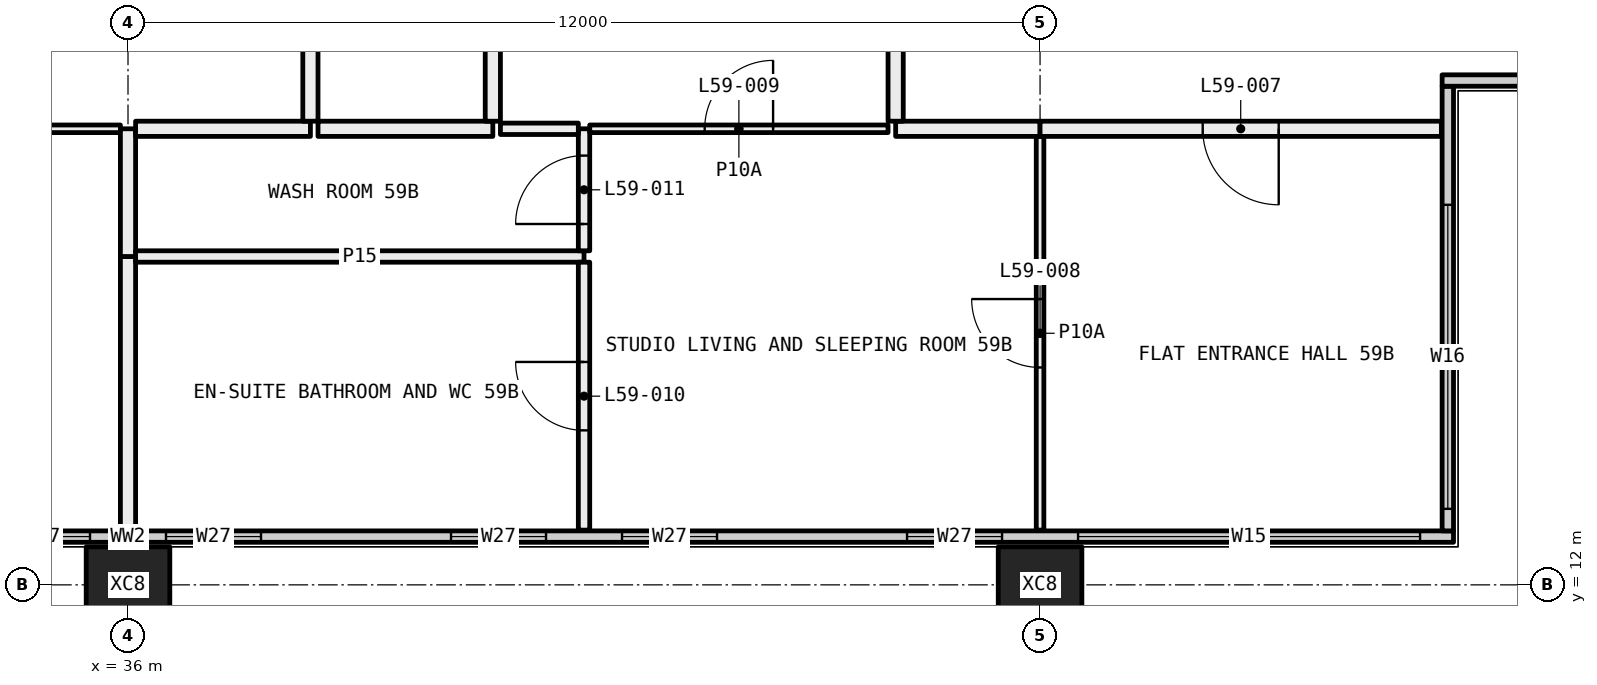
"""IFC4 building model, lengths in metres.
Left out: names, types, materials, properties, quantities, classifications, styles, units other than length and angle.
Written with IfcOpenShell. Run it as: python <this file> out.ifc"""

import sys

from ifc_helpers import new_model, si_unit, direction, frame, frame_2d, origin, origin_2d, place, context, subcontext, project, spatial, rectangle, hollow_rectangle, extrude, element, fill, save


model = new_model("IFC4")
c1 = context("Model", 3, precision=1e-05, world=origin(), true_north=direction((0.0, 1.0)))
c2 = subcontext(c1, "Body", "Model", "MODEL_VIEW")
j1 = project(units=[si_unit("LENGTHUNIT", "METRE"), si_unit("PLANEANGLEUNIT", "RADIAN")], contexts=[c1])
p1 = place(None, origin())
s1 = spatial("IfcSite", under=j1, at=p1, CompositionType="ELEMENT")
p2 = place(p1, origin())
s2 = spatial("IfcBuilding", under=s1, at=p2, CompositionType="ELEMENT")
p3 = place(p2, frame((0.0, 0.0, 221.4)))
s3 = spatial("IfcBuildingStorey", under=s2, at=p3, CompositionType="ELEMENT", Elevation=221.4)
for number, where, z_axis, x_axis in (
    (1, (36.0, 12.0, -0.4), (0.0, 0.0, 1.0), (1.0, 0.0, 0.0)),
    (2, (48.0, 12.0, -0.4), (0.0, 0.0, 1.0), (1.0, 0.0, 0.0)),
):
    element("IfcColumn", number, at=place(p3, frame(where, z_axis=z_axis, x_axis=x_axis)), inside=s3, PredefinedType="COLUMN", context=c2, shape_type="SweptSolid", body=[
        extrude(hollow_rectangle(XDim=1.1, YDim=1.0, WallThickness=0.04, at=origin_2d()), origin(), (0.0, 0.0, 1.0), 3.45),
    ])
p4 = place(p3, frame((18.56, 12.635, 0.0), z_axis=(0.0, 0.0, 1.0), x_axis=(1.0, 0.0, 0.0)))
e3 = element("IfcWall", 3, at=p4, inside=s3, PredefinedType="ELEMENTEDWALL", context=c2, shape_type="SweptSolid", body=[
    extrude(rectangle(XDim=34.88, YDim=0.15, at=frame_2d((17.44, 0.0))), origin(), (0.0, 0.0, 1.0), 3.05),
])
p5 = place(p4, frame((0.44, 0.0, 0.45)))
e4 = element("IfcOpeningElement", 4, at=p5, cuts=e3, PredefinedType="OPENING", context=c2, shape_type="SweptSolid", body=[
    extrude(rectangle(XDim=4.5, YDim=2.55, at=frame_2d((2.25, 1.275))), frame((0.0, 0.085, 0.0), z_axis=(0.0, -1.0, 0.0), x_axis=(1.0, 0.0, 0.0)), (0.0, 0.0, 1.0), 0.17),
])
p6 = place(p4, frame((5.94, 0.0, 0.45)))
e5 = element("IfcOpeningElement", 5, at=p6, cuts=e3, PredefinedType="OPENING", context=c2, shape_type="SweptSolid", body=[
    extrude(rectangle(XDim=1.25, YDim=2.55, at=frame_2d((0.625, 1.275))), frame((0.0, 0.085, 0.0), z_axis=(0.0, -1.0, 0.0), x_axis=(1.0, 0.0, 0.0)), (0.0, 0.0, 1.0), 0.17),
])
p7 = place(p4, frame((9.69, 0.0, 0.45)))
e6 = element("IfcOpeningElement", 6, at=p7, cuts=e3, PredefinedType="OPENING", context=c2, shape_type="SweptSolid", body=[
    extrude(rectangle(XDim=1.25, YDim=2.55, at=frame_2d((0.625, 1.275))), frame((0.0, 0.085, 0.0), z_axis=(0.0, -1.0, 0.0), x_axis=(1.0, 0.0, 0.0)), (0.0, 0.0, 1.0), 0.17),
])
p8 = place(p4, frame((11.94, 0.0, 0.45)))
e7 = element("IfcOpeningElement", 7, at=p8, cuts=e3, PredefinedType="OPENING", context=c2, shape_type="SweptSolid", body=[
    extrude(rectangle(XDim=1.25, YDim=2.55, at=frame_2d((0.625, 1.275))), frame((0.0, 0.085, 0.0), z_axis=(0.0, -1.0, 0.0), x_axis=(1.0, 0.0, 0.0)), (0.0, 0.0, 1.0), 0.17),
])
p9 = place(p4, frame((15.69, 0.0, 0.45)))
e8 = element("IfcOpeningElement", 8, at=p9, cuts=e3, PredefinedType="OPENING", context=c2, shape_type="SweptSolid", body=[
    extrude(rectangle(XDim=1.25, YDim=2.55, at=frame_2d((0.625, 1.275))), frame((0.0, 0.085, 0.0), z_axis=(0.0, -1.0, 0.0), x_axis=(1.0, 0.0, 0.0)), (0.0, 0.0, 1.0), 0.17),
])
p10 = place(p4, frame((17.94, 0.0, 0.45)))
e9 = element("IfcOpeningElement", 9, at=p10, cuts=e3, PredefinedType="OPENING", context=c2, shape_type="SweptSolid", body=[
    extrude(rectangle(XDim=1.25, YDim=2.55, at=frame_2d((0.625, 1.275))), frame((0.0, 0.085, 0.0), z_axis=(0.0, -1.0, 0.0), x_axis=(1.0, 0.0, 0.0)), (0.0, 0.0, 1.0), 0.17),
])
p11 = place(p4, frame((21.69, 0.0, 0.45)))
e10 = element("IfcOpeningElement", 10, at=p11, cuts=e3, PredefinedType="OPENING", context=c2, shape_type="SweptSolid", body=[
    extrude(rectangle(XDim=1.25, YDim=2.55, at=frame_2d((0.625, 1.275))), frame((0.0, 0.085, 0.0), z_axis=(0.0, -1.0, 0.0), x_axis=(1.0, 0.0, 0.0)), (0.0, 0.0, 1.0), 0.17),
])
p12 = place(p4, frame((23.94, 0.0, 0.45)))
e11 = element("IfcOpeningElement", 11, at=p12, cuts=e3, PredefinedType="OPENING", context=c2, shape_type="SweptSolid", body=[
    extrude(rectangle(XDim=1.25, YDim=2.55, at=frame_2d((0.625, 1.275))), frame((0.0, 0.085, 0.0), z_axis=(0.0, -1.0, 0.0), x_axis=(1.0, 0.0, 0.0)), (0.0, 0.0, 1.0), 0.17),
])
p13 = place(p4, frame((27.69, 0.0, 0.45)))
e12 = element("IfcOpeningElement", 12, at=p13, cuts=e3, PredefinedType="OPENING", context=c2, shape_type="SweptSolid", body=[
    extrude(rectangle(XDim=1.25, YDim=2.55, at=frame_2d((0.625, 1.275))), frame((0.0, 0.085, 0.0), z_axis=(0.0, -1.0, 0.0), x_axis=(1.0, 0.0, 0.0)), (0.0, 0.0, 1.0), 0.17),
])
p14 = place(p4, frame((29.94, 0.0, 0.45)))
e13 = element("IfcOpeningElement", 13, at=p14, cuts=e3, PredefinedType="OPENING", context=c2, shape_type="SweptSolid", body=[
    extrude(rectangle(XDim=4.5, YDim=2.55, at=frame_2d((2.25, 1.275))), frame((0.0, 0.085, 0.0), z_axis=(0.0, -1.0, 0.0), x_axis=(1.0, 0.0, 0.0)), (0.0, 0.0, 1.0), 0.17),
])
p15 = place(p3, frame((53.365, 12.71, 0.0), z_axis=(0.0, 0.0, 1.0), x_axis=(0.0, 1.0, 0.0)))
e14 = element("IfcWall", 14, at=p15, inside=s3, PredefinedType="ELEMENTEDWALL", context=c2, shape_type="SweptSolid", body=[
    extrude(rectangle(XDim=5.85, YDim=0.15, at=frame_2d((2.925, 0.0))), origin(), (0.0, 0.0, 1.0), 3.05),
])
p16 = place(p15, frame((0.29, 0.0, 0.45)))
e15 = element("IfcOpeningElement", 15, at=p16, cuts=e14, PredefinedType="OPENING", context=c2, shape_type="SweptSolid", body=[
    extrude(rectangle(XDim=4.0, YDim=2.55, at=frame_2d((2.0, 1.275))), frame((0.0, 0.085, 0.0), z_axis=(0.0, -1.0, 0.0), x_axis=(1.0, 0.0, 0.0)), (0.0, 0.0, 1.0), 0.17),
])
p17 = place(p3, frame((53.29, 18.635, 0.0), z_axis=(0.0, 0.0, 1.0), x_axis=(1.0, 0.0, 0.0)))
e16 = element("IfcWall", 16, at=p17, inside=s3, PredefinedType="ELEMENTEDWALL", context=c2, shape_type="SweptSolid", body=[
    extrude(rectangle(XDim=6.15, YDim=0.15, at=frame_2d((3.075, 0.0))), origin(), (0.0, 0.0, 1.0), 3.05),
])
p18 = place(p17, frame((1.71, 0.0, 0.45)))
e17 = element("IfcOpeningElement", 17, at=p18, cuts=e16, PredefinedType="OPENING", context=c2, shape_type="SweptSolid", body=[
    extrude(rectangle(XDim=4.0, YDim=2.55, at=frame_2d((2.0, 1.275))), frame((0.0, 0.085, 0.0), z_axis=(0.0, -1.0, 0.0), x_axis=(1.0, 0.0, 0.0)), (0.0, 0.0, 1.0), 0.17),
])
p19 = place(p3, frame((35.9, 18.0, 0.0), z_axis=(0.0, 0.0, 1.0), x_axis=(-1.0, 0.0, 0.0)))
e18 = element("IfcWall", 18, at=p19, inside=s3, PredefinedType="PARTITIONING", context=c2, shape_type="SweptSolid", body=[
    extrude(rectangle(XDim=1.4, YDim=0.1, at=frame_2d((0.7, 0.0))), origin(), (0.0, 0.0, 1.0), 3.05),
])
p20 = place(p3, frame((36.0, 12.72, 0.0), z_axis=(0.0, 0.0, 1.0), x_axis=(0.0, 1.0, 0.0)))
e19 = element("IfcWall", 19, at=p20, inside=s3, PredefinedType="PARTITIONING", context=c2, shape_type="SweptSolid", body=[
    extrude(rectangle(XDim=3.6, YDim=0.2, at=frame_2d((1.8, 0.0))), origin(), (0.0, 0.0, 1.0), 2.45),
])
p21 = place(p3, frame((36.0, 16.32, 0.0), z_axis=(0.0, 0.0, 1.0), x_axis=(0.0, 1.0, 0.0)))
e20 = element("IfcWall", 20, at=p21, inside=s3, PredefinedType="PARTITIONING", context=c2, shape_type="SweptSolid", body=[
    extrude(rectangle(XDim=1.68, YDim=0.2, at=frame_2d((0.84, 0.0))), origin(), (0.0, 0.0, 1.0), 2.45),
])
p22 = place(p3, frame((36.1, 18.0, 0.0), z_axis=(0.0, 0.0, 1.0), x_axis=(1.0, 0.0, 0.0)))
e21 = element("IfcWall", 21, at=p22, inside=s3, PredefinedType="PARTITIONING", context=c2, shape_type="SweptSolid", body=[
    extrude(rectangle(XDim=2.3, YDim=0.2, at=frame_2d((1.15, 0.0))), origin(), (0.0, 0.0, 1.0), 3.05),
])
p23 = place(p3, frame((38.4, 18.1, 0.0), z_axis=(0.0, 0.0, 1.0), x_axis=(0.0, 1.0, 0.0)))
e22 = element("IfcWall", 22, at=p23, inside=s3, PredefinedType="PARTITIONING", context=c2, shape_type="SweptSolid", body=[
    extrude(rectangle(XDim=5.7, YDim=0.2, at=frame_2d((2.85, 0.0))), origin(), (0.0, 0.0, 1.0), 3.05),
])
p24 = place(p3, frame((42.0, 16.32, 0.0), z_axis=(0.0, 0.0, 1.0), x_axis=(-1.0, 0.0, 0.0)))
e23 = element("IfcWall", 23, at=p24, inside=s3, PredefinedType="PARTITIONING", context=c2, shape_type="SweptSolid", body=[
    extrude(rectangle(XDim=5.9, YDim=0.15, at=frame_2d((2.95, 0.0))), origin(), (0.0, 0.0, 1.0), 3.05),
])
p25 = place(p3, frame((42.0, 12.72, 0.0), z_axis=(0.0, 0.0, 1.0), x_axis=(0.0, 1.0, 0.0)))
e24 = element("IfcWall", 24, at=p25, inside=s3, PredefinedType="PARTITIONING", context=c2, shape_type="SweptSolid", body=[
    extrude(rectangle(XDim=3.525, YDim=0.15, at=frame_2d((1.763, 0.0))), origin(), (0.0, 0.0, 1.0), 3.05),
])
p26 = place(p25, frame((1.312, 0.0, 0.0)))
e25 = element("IfcOpeningElement", 25, at=p26, cuts=e24, PredefinedType="OPENING", context=c2, shape_type="SweptSolid", body=[
    extrude(rectangle(XDim=0.9, YDim=2.1, at=frame_2d((0.45, 1.05))), frame((0.0, 0.085, 0.0), z_axis=(0.0, -1.0, 0.0), x_axis=(1.0, 0.0, 0.0)), (0.0, 0.0, 1.0), 0.17),
])
p27 = place(p3, frame((42.0, 16.395, 0.0), z_axis=(0.0, 0.0, 1.0), x_axis=(0.0, 1.0, 0.0)))
e26 = element("IfcWall", 26, at=p27, inside=s3, PredefinedType="PARTITIONING", context=c2, shape_type="SweptSolid", body=[
    extrude(rectangle(XDim=1.605, YDim=0.15, at=frame_2d((0.802, 0.0))), origin(), (0.0, 0.0, 1.0), 3.05),
])
p28 = place(p27, frame((0.353, 0.0, 0.0)))
e27 = element("IfcOpeningElement", 27, at=p28, cuts=e26, PredefinedType="OPENING", context=c2, shape_type="SweptSolid", body=[
    extrude(rectangle(XDim=0.9, YDim=2.1, at=frame_2d((0.45, 1.05))), frame((0.0, 0.085, 0.0), z_axis=(0.0, -1.0, 0.0), x_axis=(1.0, 0.0, 0.0)), (0.0, 0.0, 1.0), 0.17),
])
p29 = place(p3, frame((41.925, 18.0, 0.0), z_axis=(0.0, 0.0, 1.0), x_axis=(-1.0, 0.0, 0.0)))
e28 = element("IfcWall", 28, at=p29, inside=s3, PredefinedType="PARTITIONING", context=c2, shape_type="SweptSolid", body=[
    extrude(rectangle(XDim=1.025, YDim=0.15, at=frame_2d((0.513, 0.0))), origin(), (0.0, 0.0, 1.0), 3.05),
])
p30 = place(p3, frame((40.8, 18.0, 0.0), z_axis=(0.0, 0.0, 1.0), x_axis=(-1.0, 0.0, 0.0)))
e29 = element("IfcWall", 29, at=p30, inside=s3, PredefinedType="PARTITIONING", context=c2, shape_type="SweptSolid", body=[
    extrude(rectangle(XDim=2.3, YDim=0.2, at=frame_2d((1.15, 0.0))), origin(), (0.0, 0.0, 1.0), 3.05),
])
p31 = place(p3, frame((48.0, 12.72, 0.0), z_axis=(0.0, 0.0, 1.0), x_axis=(0.0, 1.0, 0.0)))
e30 = element("IfcWall", 30, at=p31, inside=s3, PredefinedType="PARTITIONING", context=c2, shape_type="SweptSolid", body=[
    extrude(rectangle(XDim=5.18, YDim=0.1, at=frame_2d((2.59, 0.0))), origin(), (0.0, 0.0, 1.0), 3.05),
])
p32 = place(p31, frame((2.14, 0.0, 0.0)))
e31 = element("IfcOpeningElement", 31, at=p32, cuts=e30, PredefinedType="OPENING", context=c2, shape_type="SweptSolid", body=[
    extrude(rectangle(XDim=0.9, YDim=2.1, at=frame_2d((0.45, 1.05))), frame((0.0, 0.06, 0.0), z_axis=(0.0, -1.0, 0.0), x_axis=(1.0, 0.0, 0.0)), (0.0, 0.0, 1.0), 0.12),
])
p33 = place(p3, frame((46.0, 18.0, 0.0), z_axis=(0.0, 0.0, 1.0), x_axis=(-1.0, 0.0, 0.0)))
e32 = element("IfcWall", 32, at=p33, inside=s3, PredefinedType="PARTITIONING", context=c2, shape_type="SweptSolid", body=[
    extrude(rectangle(XDim=3.925, YDim=0.1, at=frame_2d((1.962, 0.0))), origin(), (0.0, 0.0, 1.0), 3.05),
])
p34 = place(p33, frame((1.512, 0.0, 0.0)))
e33 = element("IfcOpeningElement", 33, at=p34, cuts=e32, PredefinedType="OPENING", context=c2, shape_type="SweptSolid", body=[
    extrude(rectangle(XDim=0.9, YDim=2.1, at=frame_2d((0.45, 1.05))), frame((0.0, 0.06, 0.0), z_axis=(0.0, -1.0, 0.0), x_axis=(1.0, 0.0, 0.0)), (0.0, 0.0, 1.0), 0.12),
])
p35 = place(p3, frame((48.0, 18.0, 0.0), z_axis=(0.0, 0.0, 1.0), x_axis=(-1.0, 0.0, 0.0)))
e34 = element("IfcWall", 34, at=p35, inside=s3, PredefinedType="PARTITIONING", context=c2, shape_type="SweptSolid", body=[
    extrude(rectangle(XDim=1.9, YDim=0.2, at=frame_2d((0.95, 0.0))), origin(), (0.0, 0.0, 1.0), 3.05),
])
p36 = place(p3, frame((53.28, 18.0, 0.0), z_axis=(0.0, 0.0, 1.0), x_axis=(-1.0, 0.0, 0.0)))
e35 = element("IfcWall", 35, at=p36, inside=s3, PredefinedType="PARTITIONING", context=c2, shape_type="SweptSolid", body=[
    extrude(rectangle(XDim=5.28, YDim=0.2, at=frame_2d((2.64, 0.0))), origin(), (0.0, 0.0, 1.0), 3.05),
])
p37 = place(p36, frame((2.14, 0.0, 0.0)))
e36 = element("IfcOpeningElement", 36, at=p37, cuts=e35, PredefinedType="OPENING", context=c2, shape_type="SweptSolid", body=[
    extrude(rectangle(XDim=1.0, YDim=2.1, at=frame_2d((0.5, 1.05))), frame((0.0, 0.11, 0.0), z_axis=(0.0, -1.0, 0.0), x_axis=(1.0, 0.0, 0.0)), (0.0, 0.0, 1.0), 0.22),
])
p38 = place(p3, frame((46.1, 18.1, 0.0), z_axis=(0.0, 0.0, 1.0), x_axis=(0.0, 1.0, 0.0)))
e37 = element("IfcWall", 37, at=p38, inside=s3, PredefinedType="PARTITIONING", context=c2, shape_type="SweptSolid", body=[
    extrude(rectangle(XDim=5.7, YDim=0.2, at=frame_2d((2.85, 0.0))), origin(), (0.0, 0.0, 1.0), 3.05),
])
p39 = place(p3, frame((40.8, 23.7, 0.0), z_axis=(0.0, 0.0, 1.0), x_axis=(0.0, -1.0, 0.0)))
e38 = element("IfcWall", 38, at=p39, inside=s3, PredefinedType="PARTITIONING", context=c2, shape_type="SweptSolid", body=[
    extrude(rectangle(XDim=5.6, YDim=0.2, at=frame_2d((2.8, 0.0))), origin(), (0.0, 0.0, 1.0), 3.05),
])
p40 = place(p9, origin())
e39 = element("IfcWindow", 39, at=p40, inside=s3, PartitioningType="SINGLE_PANEL", PredefinedType="WINDOW", context=c2, shape_type="SweptSolid", body=[
    extrude(rectangle(XDim=1.25, YDim=2.55, at=frame_2d((0.625, 1.275))), frame((0.0, 0.03, 0.0), z_axis=(0.0, -1.0, 0.0), x_axis=(1.0, 0.0, 0.0)), (0.0, 0.0, 1.0), 0.06),
])
fill(e8, e39)
p41 = place(p10, origin())
e40 = element("IfcWindow", 40, at=p41, inside=s3, PartitioningType="SINGLE_PANEL", PredefinedType="WINDOW", context=c2, shape_type="SweptSolid", body=[
    extrude(rectangle(XDim=1.25, YDim=2.55, at=frame_2d((0.625, 1.275))), frame((0.0, 0.03, 0.0), z_axis=(0.0, -1.0, 0.0), x_axis=(1.0, 0.0, 0.0)), (0.0, 0.0, 1.0), 0.06),
])
fill(e9, e40)
p42 = place(p11, origin())
e41 = element("IfcWindow", 41, at=p42, inside=s3, PartitioningType="SINGLE_PANEL", PredefinedType="WINDOW", context=c2, shape_type="SweptSolid", body=[
    extrude(rectangle(XDim=1.25, YDim=2.55, at=frame_2d((0.625, 1.275))), frame((0.0, 0.03, 0.0), z_axis=(0.0, -1.0, 0.0), x_axis=(1.0, 0.0, 0.0)), (0.0, 0.0, 1.0), 0.06),
])
fill(e10, e41)
p43 = place(p12, origin())
e42 = element("IfcWindow", 42, at=p43, inside=s3, PartitioningType="SINGLE_PANEL", PredefinedType="WINDOW", context=c2, shape_type="SweptSolid", body=[
    extrude(rectangle(XDim=1.25, YDim=2.55, at=frame_2d((0.625, 1.275))), frame((0.0, 0.03, 0.0), z_axis=(0.0, -1.0, 0.0), x_axis=(1.0, 0.0, 0.0)), (0.0, 0.0, 1.0), 0.06),
])
fill(e11, e42)
p44 = place(p13, origin())
e43 = element("IfcWindow", 43, at=p44, inside=s3, PartitioningType="SINGLE_PANEL", PredefinedType="WINDOW", context=c2, shape_type="SweptSolid", body=[
    extrude(rectangle(XDim=1.25, YDim=2.55, at=frame_2d((0.625, 1.275))), frame((0.0, 0.03, 0.0), z_axis=(0.0, -1.0, 0.0), x_axis=(1.0, 0.0, 0.0)), (0.0, 0.0, 1.0), 0.06),
])
fill(e12, e43)
p45 = place(p14, origin())
e44 = element("IfcWindow", 44, at=p45, inside=s3, PartitioningType="SINGLE_PANEL", PredefinedType="WINDOW", context=c2, shape_type="SweptSolid", body=[
    extrude(rectangle(XDim=4.5, YDim=2.55, at=frame_2d((2.25, 1.275))), frame((0.0, 0.03, 0.0), z_axis=(0.0, -1.0, 0.0), x_axis=(1.0, 0.0, 0.0)), (0.0, 0.0, 1.0), 0.06),
])
fill(e13, e44)
p46 = place(p16, origin())
e45 = element("IfcWindow", 45, at=p46, inside=s3, PartitioningType="SINGLE_PANEL", PredefinedType="WINDOW", context=c2, shape_type="SweptSolid", body=[
    extrude(rectangle(XDim=4.0, YDim=2.55, at=frame_2d((2.0, 1.275))), frame((0.0, 0.03, 0.0), z_axis=(0.0, -1.0, 0.0), x_axis=(1.0, 0.0, 0.0)), (0.0, 0.0, 1.0), 0.06),
])
fill(e15, e45)
p47 = place(p37, origin())
e46 = element("IfcDoor", 46, at=p47, inside=s3, OperationType="SINGLE_SWING_RIGHT", PredefinedType="DOOR", context=c2, shape_type="SweptSolid", body=[
    extrude(rectangle(XDim=1.0, YDim=2.1, at=frame_2d((0.5, 1.05))), frame((0.0, 0.025, 0.0), z_axis=(0.0, -1.0, 0.0), x_axis=(1.0, 0.0, 0.0)), (0.0, 0.0, 1.0), 0.05),
])
fill(e36, e46)
p48 = place(p32, origin())
e47 = element("IfcDoor", 47, at=p48, inside=s3, OperationType="SINGLE_SWING_LEFT", PredefinedType="DOOR", context=c2, shape_type="SweptSolid", body=[
    extrude(rectangle(XDim=0.9, YDim=2.1, at=frame_2d((0.45, 1.05))), frame((0.0, 0.025, 0.0), z_axis=(0.0, -1.0, 0.0), x_axis=(1.0, 0.0, 0.0)), (0.0, 0.0, 1.0), 0.05),
])
fill(e31, e47)
p49 = place(p34, frame((0.9, 0.0, 0.0), x_axis=(-1.0, 0.0, 0.0)))
e48 = element("IfcDoor", 48, at=p49, inside=s3, OperationType="SINGLE_SWING_LEFT", PredefinedType="DOOR", context=c2, shape_type="SweptSolid", body=[
    extrude(rectangle(XDim=0.9, YDim=2.1, at=frame_2d((0.45, 1.05))), frame((0.0, 0.025, 0.0), z_axis=(0.0, -1.0, 0.0), x_axis=(1.0, 0.0, 0.0)), (0.0, 0.0, 1.0), 0.05),
])
fill(e33, e48)
p50 = place(p26, origin())
e49 = element("IfcDoor", 49, at=p50, inside=s3, OperationType="SINGLE_SWING_LEFT", PredefinedType="DOOR", context=c2, shape_type="SweptSolid", body=[
    extrude(rectangle(XDim=0.9, YDim=2.1, at=frame_2d((0.45, 1.05))), frame((0.0, 0.025, 0.0), z_axis=(0.0, -1.0, 0.0), x_axis=(1.0, 0.0, 0.0)), (0.0, 0.0, 1.0), 0.05),
])
fill(e25, e49)
p51 = place(p28, origin())
e50 = element("IfcDoor", 50, at=p51, inside=s3, OperationType="SINGLE_SWING_RIGHT", PredefinedType="DOOR", context=c2, shape_type="SweptSolid", body=[
    extrude(rectangle(XDim=0.9, YDim=2.1, at=frame_2d((0.45, 1.05))), frame((0.0, 0.025, 0.0), z_axis=(0.0, -1.0, 0.0), x_axis=(1.0, 0.0, 0.0)), (0.0, 0.0, 1.0), 0.05),
])
fill(e27, e50)
save(model, sys.argv[1])
